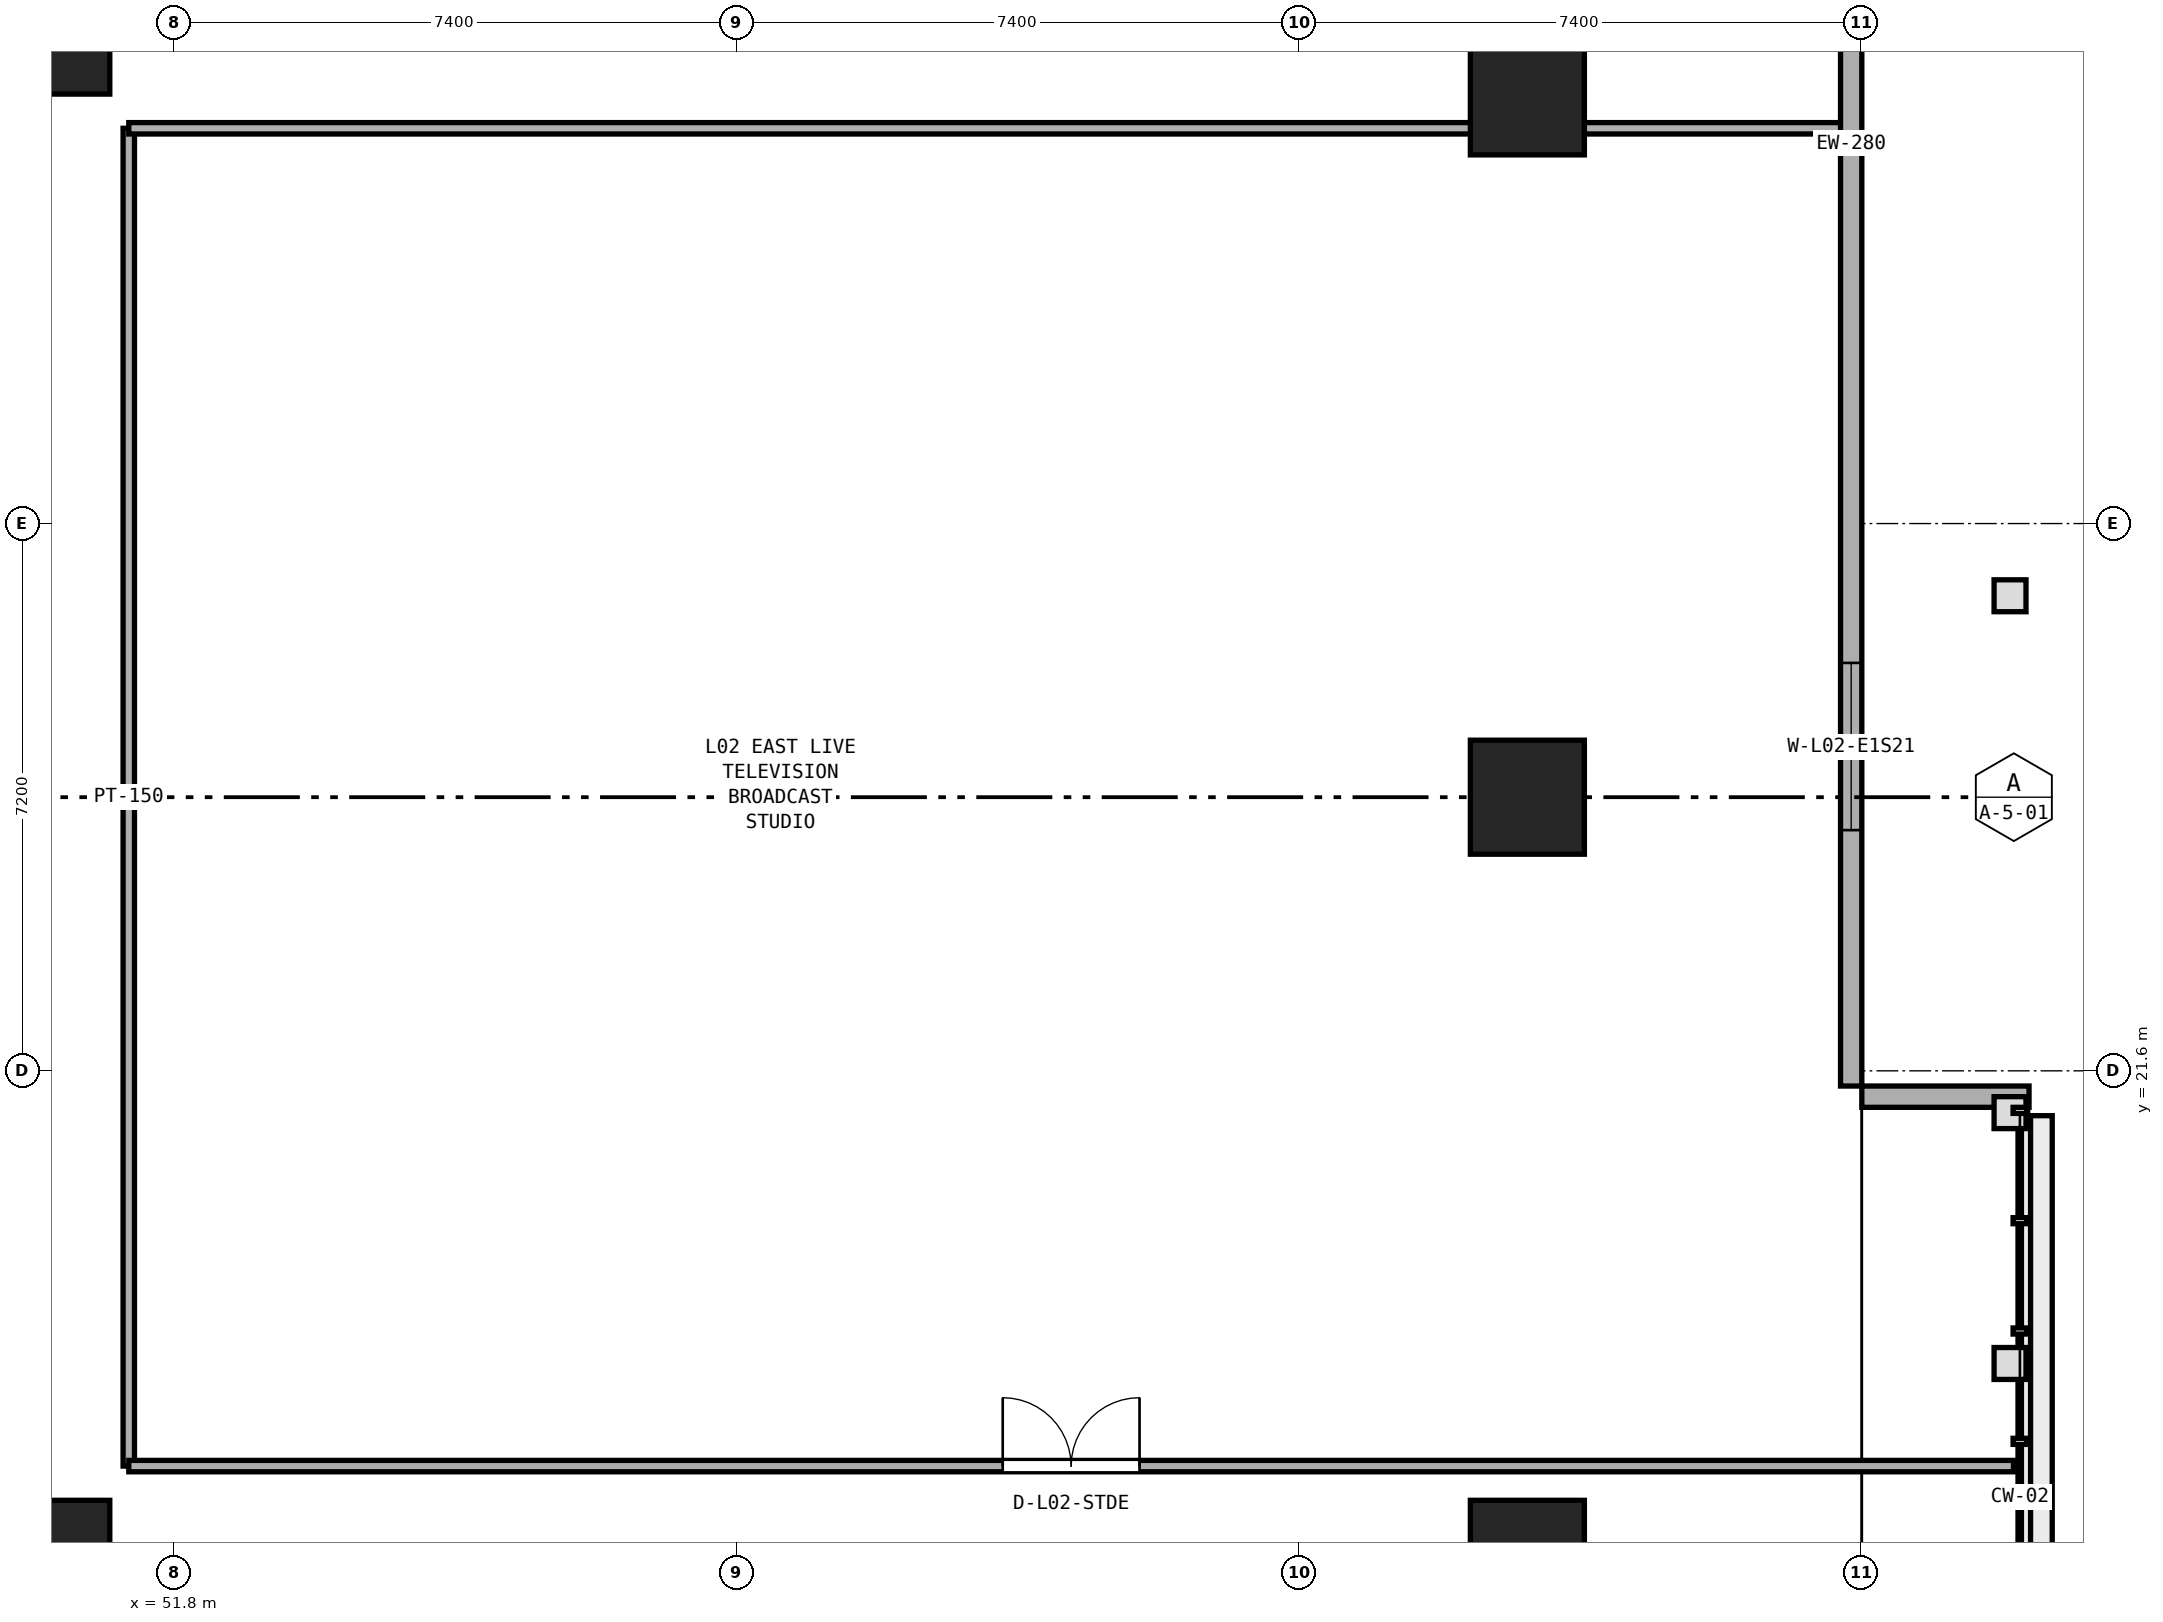
"""IFC4 building model, lengths in metres.
Left out: names, types, materials, properties, quantities, classifications, styles, units other than length and angle.
Written with IfcOpenShell. Run it as: python <this file> out.ifc"""

import sys

from ifc_helpers import new_model, si_unit, direction, frame, frame_2d, origin, origin_2d, place, context, subcontext, project, spatial, rectangle, extrude, element, fill, save


model = new_model("IFC4")
c1 = context("Model", 3, precision=1e-05, world=origin(), true_north=direction((0.0, 1.0)))
c2 = subcontext(c1, "Body", "Model", "MODEL_VIEW")
j1 = project(units=[si_unit("LENGTHUNIT", "METRE"), si_unit("PLANEANGLEUNIT", "RADIAN")], contexts=[c1])
p1 = place(None, origin())
s1 = spatial("IfcSite", under=j1, at=p1, CompositionType="ELEMENT")
p2 = place(p1, origin())
s2 = spatial("IfcBuilding", under=s1, at=p2, CompositionType="ELEMENT")
p3 = place(p2, frame((0.0, 0.0, 10.0)))
s3 = spatial("IfcBuildingStorey", under=s2, at=p3, CompositionType="ELEMENT", Elevation=10.0)
for number, where, z_axis, x_axis in (
    (1, (69.6, 15.2, 0.0), (0.0, 0.0, 1.0), (1.0, 0.0, 0.0)),
    (2, (69.6, 25.2, 0.0), (0.0, 0.0, 1.0), (1.0, 0.0, 0.0)),
    (3, (69.6, 34.4, 0.0), (0.0, 0.0, 1.0), (1.0, 0.0, 0.0)),
    (4, (50.2, 15.2, 0.0), (0.0, 0.0, 1.0), (1.0, 0.0, 0.0)),
    (5, (50.2, 35.2, 0.0), (0.0, 0.0, 1.0), (1.0, 0.0, 0.0)),
):
    element("IfcColumn", number, at=place(p3, frame(where, z_axis=z_axis, x_axis=x_axis)), inside=s3, PredefinedType="COLUMN", context=c2, shape_type="SweptSolid", body=[
        extrude(rectangle(XDim=1.5, YDim=1.5, at=origin_2d()), origin(), (0.0, 0.0, 1.0), 5.0),
    ])
p4 = place(p3, frame((51.2, 16.4, 0.0), z_axis=(0.0, 0.0, 1.0), x_axis=(0.0, 1.0, 0.0)))
e6 = element("IfcWall", 6, at=p4, inside=s3, PredefinedType="PARTITIONING", context=c2, shape_type="SweptSolid", body=[
    extrude(rectangle(XDim=17.6, YDim=0.15, at=frame_2d((8.8, 0.0))), origin(), (0.0, 0.0, 1.0), 4.68),
])
p5 = place(p3, frame((51.2, 16.4, 0.0), z_axis=(0.0, 0.0, 1.0), x_axis=(1.0, 0.0, 0.0)))
e7 = element("IfcWall", 7, at=p5, inside=s3, PredefinedType="PARTITIONING", context=c2, shape_type="SweptSolid", body=[
    extrude(rectangle(XDim=24.795, YDim=0.15, at=frame_2d((12.397, 0.0))), origin(), (0.0, 0.0, 1.0), 4.68),
])
p6 = place(p5, frame((11.498, 0.0, 0.0)))
e8 = element("IfcOpeningElement", 8, at=p6, cuts=e7, PredefinedType="OPENING", context=c2, shape_type="SweptSolid", body=[
    extrude(rectangle(XDim=1.8, YDim=2.15, at=frame_2d((0.9, 1.075))), frame((0.0, 0.085, 0.0), z_axis=(0.0, -1.0, 0.0), x_axis=(1.0, 0.0, 0.0)), (0.0, 0.0, 1.0), 0.17),
])
p7 = place(p3, frame((51.2, 34.0, 0.0), z_axis=(0.0, 0.0, 1.0), x_axis=(1.0, 0.0, 0.0)))
e9 = element("IfcWall", 9, at=p7, inside=s3, PredefinedType="PARTITIONING", context=c2, shape_type="SweptSolid", body=[
    extrude(rectangle(XDim=22.595, YDim=0.15, at=frame_2d((11.297, 0.0))), origin(), (0.0, 0.0, 1.0), 3.78),
])
p8 = place(p3, frame((73.86, 21.4, 0.0), z_axis=(0.0, 0.0, 1.0), x_axis=(0.0, 1.0, 0.0)))
e10 = element("IfcWall", 10, at=p8, inside=s3, PredefinedType="STANDARD", context=c2, shape_type="SweptSolid", body=[
    extrude(rectangle(XDim=24.8, YDim=0.28, at=frame_2d((12.4, 0.0))), origin(), (0.0, 0.0, 1.0), 3.78),
])
p9 = place(p8, frame((3.367, 0.0, 0.9)))
e11 = element("IfcOpeningElement", 11, at=p9, cuts=e10, PredefinedType="OPENING", context=c2, shape_type="SweptSolid", body=[
    extrude(rectangle(XDim=2.2, YDim=1.95, at=frame_2d((1.1, 0.975))), frame((0.0, 0.15, 0.0), z_axis=(0.0, -1.0, 0.0), x_axis=(1.0, 0.0, 0.0)), (0.0, 0.0, 1.0), 0.3),
])
p10 = place(p8, frame((19.233, 0.0, 0.9)))
e12 = element("IfcOpeningElement", 12, at=p10, cuts=e10, PredefinedType="OPENING", context=c2, shape_type="SweptSolid", body=[
    extrude(rectangle(XDim=2.2, YDim=1.95, at=frame_2d((1.1, 0.975))), frame((0.0, 0.15, 0.0), z_axis=(0.0, -1.0, 0.0), x_axis=(1.0, 0.0, 0.0)), (0.0, 0.0, 1.0), 0.3),
])
p11 = place(p3, frame((74.0, 21.26, 0.0), z_axis=(0.0, 0.0, 1.0), x_axis=(1.0, 0.0, 0.0)))
e13 = element("IfcWall", 13, at=p11, inside=s3, PredefinedType="STANDARD", context=c2, shape_type="SweptSolid", body=[
    extrude(rectangle(XDim=2.2, YDim=0.28, at=frame_2d((1.1, 0.0))), origin(), (0.0, 0.0, 1.0), 3.987),
])
p12 = place(p6, origin())
e14 = element("IfcDoor", 14, at=p12, inside=s3, OperationType="DOUBLE_DOOR_SINGLE_SWING", PredefinedType="DOOR", context=c2, shape_type="SweptSolid", body=[
    extrude(rectangle(XDim=1.8, YDim=2.15, at=frame_2d((0.9, 1.075))), frame((0.0, 0.025, 0.0), z_axis=(0.0, -1.0, 0.0), x_axis=(1.0, 0.0, 0.0)), (0.0, 0.0, 1.0), 0.05),
])
fill(e8, e14)
p13 = place(p9, origin())
e15 = element("IfcWindow", 15, at=p13, inside=s3, PartitioningType="SINGLE_PANEL", PredefinedType="WINDOW", context=c2, shape_type="SweptSolid", body=[
    extrude(rectangle(XDim=2.2, YDim=1.95, at=frame_2d((1.1, 0.975))), frame((0.0, 0.03, 0.0), z_axis=(0.0, -1.0, 0.0), x_axis=(1.0, 0.0, 0.0)), (0.0, 0.0, 1.0), 0.06),
])
fill(e11, e15)
save(model, sys.argv[1])
